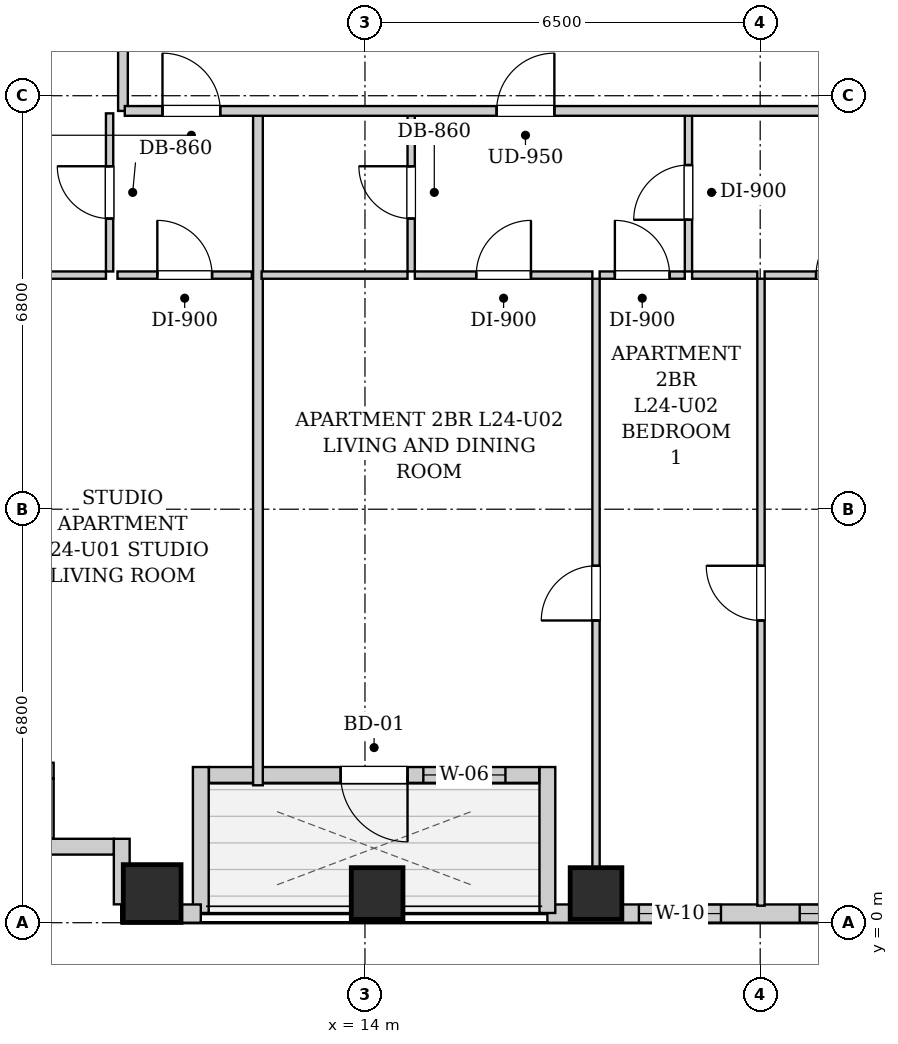
"""IFC4 building model, lengths in metres.
Left out: names, types, materials, properties, quantities, classifications, styles, units other than length and angle.
Written with IfcOpenShell. Run it as: python <this file> out.ifc"""

import sys

from ifc_helpers import new_model, si_unit, direction, frame, frame_2d, origin, origin_2d, place, context, subcontext, project, spatial, rectangle, extrude, element, fill, save


model = new_model("IFC4")
c1 = context("Model", 3, precision=1e-05, world=origin(), true_north=direction((0.0, 1.0)))
c2 = subcontext(c1, "Body", "Model", "MODEL_VIEW")
j1 = project(units=[si_unit("LENGTHUNIT", "METRE"), si_unit("PLANEANGLEUNIT", "RADIAN")], contexts=[c1])
p1 = place(None, origin())
s1 = spatial("IfcSite", under=j1, at=p1, CompositionType="ELEMENT")
p2 = place(p1, origin())
s2 = spatial("IfcBuilding", under=s1, at=p2, CompositionType="ELEMENT")
p3 = place(p2, frame((0.0, 0.0, 87.9)))
s3 = spatial("IfcBuildingStorey", under=s2, at=p3, CompositionType="ELEMENT", Elevation=87.9)
p4 = place(p3, frame((10.5, 0.48, 0.0), z_axis=(0.0, 0.0, 1.0), x_axis=(1.0, 0.0, 0.0)))
e1 = element("IfcColumn", 1, at=p4, inside=s3, PredefinedType="COLUMN", context=c2, shape_type="SweptSolid", body=[
    extrude(rectangle(XDim=0.95, YDim=0.95, at=origin_2d()), origin(), (0.0, 0.0, 1.0), 3.2),
])
for number, where, z_axis, x_axis in (
    (2, (14.2, 0.48, 0.0), (0.0, 0.0, 1.0), (1.0, 0.0, 0.0)),
    (3, (17.8, 0.48, 0.0), (0.0, 0.0, 1.0), (1.0, 0.0, 0.0)),
):
    element("IfcColumn", number, at=place(p3, frame(where, z_axis=z_axis, x_axis=x_axis)), inside=s3, PredefinedType="COLUMN", context=c2, shape_type="SweptSolid", body=[
        extrude(rectangle(XDim=0.85, YDim=0.85, at=origin_2d()), origin(), (0.0, 0.0, 1.0), 3.2),
    ])
p5 = place(p3, frame((40.9, 0.15, 0.0), z_axis=(0.0, 0.0, 1.0), x_axis=(-1.0, 0.0, 0.0)))
e4 = element("IfcWall", 4, at=p5, inside=s3, PredefinedType="SOLIDWALL", context=c2, shape_type="SweptSolid", body=[
    extrude(rectangle(XDim=23.9, YDim=0.3, at=frame_2d((11.95, 0.0))), origin(), (0.0, 0.0, 1.0), 2.94),
])
p6 = place(p5, frame((21.045, 0.0, 0.55)))
e5 = element("IfcOpeningElement", 5, at=p6, cuts=e4, PredefinedType="OPENING", context=c2, shape_type="SweptSolid", body=[
    extrude(rectangle(XDim=1.35, YDim=1.2, at=frame_2d((0.675, 0.6))), frame((0.0, 0.16, 0.0), z_axis=(0.0, -1.0, 0.0), x_axis=(1.0, 0.0, 0.0)), (0.0, 0.0, 1.0), 0.32),
])
p7 = place(p5, frame((18.4, 0.0, 0.55)))
e6 = element("IfcOpeningElement", 6, at=p7, cuts=e4, PredefinedType="OPENING", context=c2, shape_type="SweptSolid", body=[
    extrude(rectangle(XDim=1.35, YDim=1.2, at=frame_2d((0.675, 0.6))), frame((0.0, 0.16, 0.0), z_axis=(0.0, -1.0, 0.0), x_axis=(1.0, 0.0, 0.0)), (0.0, 0.0, 1.0), 0.32),
])
p8 = place(p5, frame((12.05, 0.0, 0.55)))
e7 = element("IfcOpeningElement", 7, at=p8, cuts=e4, PredefinedType="OPENING", context=c2, shape_type="SweptSolid", body=[
    extrude(rectangle(XDim=1.35, YDim=1.2, at=frame_2d((0.675, 0.6))), frame((0.0, 0.16, 0.0), z_axis=(0.0, -1.0, 0.0), x_axis=(1.0, 0.0, 0.0)), (0.0, 0.0, 1.0), 0.32),
])
p9 = place(p5, frame((8.72, 0.0, 0.55)))
e8 = element("IfcOpeningElement", 8, at=p9, cuts=e4, PredefinedType="OPENING", context=c2, shape_type="SweptSolid", body=[
    extrude(rectangle(XDim=1.35, YDim=1.2, at=frame_2d((0.675, 0.6))), frame((0.0, 0.16, 0.0), z_axis=(0.0, -1.0, 0.0), x_axis=(1.0, 0.0, 0.0)), (0.0, 0.0, 1.0), 0.32),
])
p10 = place(p5, frame((5.563, 0.0, 0.55)))
e9 = element("IfcOpeningElement", 9, at=p10, cuts=e4, PredefinedType="OPENING", context=c2, shape_type="SweptSolid", body=[
    extrude(rectangle(XDim=1.35, YDim=1.2, at=frame_2d((0.675, 0.6))), frame((0.0, 0.16, 0.0), z_axis=(0.0, -1.0, 0.0), x_axis=(1.0, 0.0, 0.0)), (0.0, 0.0, 1.0), 0.32),
])
p11 = place(p3, frame((17.0, 0.16, 0.0), z_axis=(0.0, 0.0, 1.0), x_axis=(0.0, 1.0, 0.0)))
e10 = element("IfcWall", 10, at=p11, inside=s3, PredefinedType="SOLIDWALL", context=c2, shape_type="SweptSolid", body=[
    extrude(rectangle(XDim=2.4, YDim=0.26, at=frame_2d((1.2, 0.0))), origin(), (0.0, 0.0, 1.0), 2.94),
])
p12 = place(p3, frame((16.866, 2.43, 0.0), z_axis=(0.0, 0.0, 1.0), x_axis=(-1.0, 0.0, 0.0)))
e11 = element("IfcWall", 11, at=p12, inside=s3, PredefinedType="SOLIDWALL", context=c2, shape_type="SweptSolid", body=[
    extrude(rectangle(XDim=5.432, YDim=0.26, at=frame_2d((2.716, 0.0))), origin(), (0.0, 0.0, 1.0), 2.94),
])
p13 = place(p12, frame((2.166, 0.0, 0.0)))
e12 = element("IfcOpeningElement", 12, at=p13, cuts=e11, PredefinedType="OPENING", context=c2, shape_type="SweptSolid", body=[
    extrude(rectangle(XDim=1.1, YDim=2.0, at=frame_2d((0.55, 1.0))), frame((0.0, 0.14, 0.0), z_axis=(0.0, -1.0, 0.0), x_axis=(1.0, 0.0, 0.0)), (0.0, 0.0, 1.0), 0.28),
])
p14 = place(p12, frame((0.556, 0.0, 0.85)))
e13 = element("IfcOpeningElement", 13, at=p14, cuts=e11, PredefinedType="OPENING", context=c2, shape_type="SweptSolid", body=[
    extrude(rectangle(XDim=1.35, YDim=1.65, at=frame_2d((0.675, 0.825))), frame((0.0, 0.14, 0.0), z_axis=(0.0, -1.0, 0.0), x_axis=(1.0, 0.0, 0.0)), (0.0, 0.0, 1.0), 0.28),
])
p15 = place(p3, frame((11.3, 2.56, 0.0), z_axis=(0.0, 0.0, 1.0), x_axis=(0.0, -1.0, 0.0)))
e14 = element("IfcWall", 14, at=p15, inside=s3, PredefinedType="SOLIDWALL", context=c2, shape_type="SweptSolid", body=[
    extrude(rectangle(XDim=2.4, YDim=0.26, at=frame_2d((1.2, 0.0))), origin(), (0.0, 0.0, 1.0), 2.94),
])
p16 = place(p3, frame((11.3, 0.15, 0.0), z_axis=(0.0, 0.0, 1.0), x_axis=(-1.0, 0.0, 0.0)))
e15 = element("IfcWall", 15, at=p16, inside=s3, PredefinedType="SOLIDWALL", context=c2, shape_type="SweptSolid", body=[
    extrude(rectangle(XDim=1.3, YDim=0.3, at=frame_2d((0.65, 0.0))), origin(), (0.0, 0.0, 1.0), 2.94),
])
p17 = place(p3, frame((10.0, 0.302, 0.0), z_axis=(0.0, 0.0, 1.0), x_axis=(0.0, 1.0, 0.0)))
e16 = element("IfcWall", 16, at=p17, inside=s3, PredefinedType="SOLIDWALL", context=c2, shape_type="SweptSolid", body=[
    extrude(rectangle(XDim=1.078, YDim=0.26, at=frame_2d((0.539, 0.0))), origin(), (0.0, 0.0, 1.0), 2.94),
])
p18 = place(p3, frame((9.868, 1.25, 0.0), z_axis=(0.0, 0.0, 1.0), x_axis=(-1.0, 0.0, 0.0)))
e17 = element("IfcWall", 17, at=p18, inside=s3, PredefinedType="SOLIDWALL", context=c2, shape_type="SweptSolid", body=[
    extrude(rectangle(XDim=1.248, YDim=0.26, at=frame_2d((0.624, 0.0))), origin(), (0.0, 0.0, 1.0), 2.94),
])
p19 = place(p3, frame((8.75, 1.382, 0.0), z_axis=(0.0, 0.0, 1.0), x_axis=(0.0, 1.0, 0.0)))
e18 = element("IfcWall", 18, at=p19, inside=s3, PredefinedType="SOLIDWALL", context=c2, shape_type="SweptSolid", body=[
    extrude(rectangle(XDim=0.986, YDim=0.26, at=frame_2d((0.493, 0.0))), origin(), (0.0, 0.0, 1.0), 2.94),
])
p20 = place(p3, frame((8.88, 2.5, 0.0), z_axis=(0.0, 0.0, 1.0), x_axis=(-1.0, 0.0, 0.0)))
e19 = element("IfcWall", 19, at=p20, inside=s3, PredefinedType="SOLIDWALL", context=c2, shape_type="SweptSolid", body=[
    extrude(rectangle(XDim=1.078, YDim=0.26, at=frame_2d((0.539, 0.0))), origin(), (0.0, 0.0, 1.0), 2.94),
])
p21 = place(p3, frame((10.02, 13.35, 0.0), z_axis=(0.0, 0.0, 1.0), x_axis=(0.0, 1.0, 0.0)))
e20 = element("IfcWall", 20, at=p21, inside=s3, PredefinedType="PARTITIONING", context=c2, shape_type="SweptSolid", body=[
    extrude(rectangle(XDim=1.74, YDim=0.16, at=frame_2d((0.87, 0.0))), origin(), (0.0, 0.0, 1.0), 2.94),
])
p22 = place(p3, frame((9.8, 10.71, 0.0), z_axis=(0.0, 0.0, 1.0), x_axis=(0.0, 1.0, 0.0)))
e21 = element("IfcWall", 21, at=p22, inside=s3, PredefinedType="PARTITIONING", context=c2, shape_type="SweptSolid", body=[
    extrude(rectangle(XDim=2.6, YDim=0.12, at=frame_2d((1.3, 0.0))), origin(), (0.0, 0.0, 1.0), 2.94),
])
p23 = place(p22, frame((0.87, 0.0, 0.0)))
e22 = element("IfcOpeningElement", 22, at=p23, cuts=e21, PredefinedType="OPENING", context=c2, shape_type="SweptSolid", body=[
    extrude(rectangle(XDim=0.86, YDim=2.05, at=frame_2d((0.43, 1.025))), frame((0.0, 0.07, 0.0), z_axis=(0.0, -1.0, 0.0), x_axis=(1.0, 0.0, 0.0)), (0.0, 0.0, 1.0), 0.14),
])
p24 = place(p3, frame((7.89, 10.65, 0.0), z_axis=(0.0, 0.0, 1.0), x_axis=(1.0, 0.0, 0.0)))
e23 = element("IfcWall", 23, at=p24, inside=s3, PredefinedType="PARTITIONING", context=c2, shape_type="SweptSolid", body=[
    extrude(rectangle(XDim=1.85, YDim=0.12, at=frame_2d((0.925, 0.0))), origin(), (0.0, 0.0, 1.0), 2.94),
])
p25 = place(p3, frame((9.93, 10.65, 0.0), z_axis=(0.0, 0.0, 1.0), x_axis=(1.0, 0.0, 0.0)))
e24 = element("IfcWall", 24, at=p25, inside=s3, PredefinedType="PARTITIONING", context=c2, shape_type="SweptSolid", body=[
    extrude(rectangle(XDim=2.21, YDim=0.12, at=frame_2d((1.105, 0.0))), origin(), (0.0, 0.0, 1.0), 2.94),
])
p26 = place(p25, frame((0.655, 0.0, 0.0)))
e25 = element("IfcOpeningElement", 25, at=p26, cuts=e24, PredefinedType="OPENING", context=c2, shape_type="SweptSolid", body=[
    extrude(rectangle(XDim=0.9, YDim=2.05, at=frame_2d((0.45, 1.025))), frame((0.0, 0.07, 0.0), z_axis=(0.0, -1.0, 0.0), x_axis=(1.0, 0.0, 0.0)), (0.0, 0.0, 1.0), 0.14),
])
p27 = place(p3, frame((12.24, 2.26, 0.0), z_axis=(0.0, 0.0, 1.0), x_axis=(0.0, 1.0, 0.0)))
e26 = element("IfcWall", 26, at=p27, inside=s3, PredefinedType="PARTITIONING", context=c2, shape_type="SweptSolid", body=[
    extrude(rectangle(XDim=11.05, YDim=0.16, at=frame_2d((5.525, 0.0))), origin(), (0.0, 0.0, 1.0), 2.94),
])
p28 = place(p3, frame((14.76, 10.71, 0.0), z_axis=(0.0, 0.0, 1.0), x_axis=(0.0, 1.0, 0.0)))
e27 = element("IfcWall", 27, at=p28, inside=s3, PredefinedType="PARTITIONING", context=c2, shape_type="SweptSolid", body=[
    extrude(rectangle(XDim=2.6, YDim=0.12, at=frame_2d((1.3, 0.0))), origin(), (0.0, 0.0, 1.0), 2.94),
])
p29 = place(p28, frame((0.87, 0.0, 0.0)))
e28 = element("IfcOpeningElement", 28, at=p29, cuts=e27, PredefinedType="OPENING", context=c2, shape_type="SweptSolid", body=[
    extrude(rectangle(XDim=0.86, YDim=2.05, at=frame_2d((0.43, 1.025))), frame((0.0, 0.07, 0.0), z_axis=(0.0, -1.0, 0.0), x_axis=(1.0, 0.0, 0.0)), (0.0, 0.0, 1.0), 0.14),
])
p30 = place(p3, frame((12.3, 10.65, 0.0), z_axis=(0.0, 0.0, 1.0), x_axis=(1.0, 0.0, 0.0)))
e29 = element("IfcWall", 29, at=p30, inside=s3, PredefinedType="PARTITIONING", context=c2, shape_type="SweptSolid", body=[
    extrude(rectangle(XDim=2.4, YDim=0.12, at=frame_2d((1.2, 0.0))), origin(), (0.0, 0.0, 1.0), 2.94),
])
p31 = place(p3, frame((19.32, 10.71, 0.0), z_axis=(0.0, 0.0, 1.0), x_axis=(0.0, 1.0, 0.0)))
e30 = element("IfcWall", 30, at=p31, inside=s3, PredefinedType="PARTITIONING", context=c2, shape_type="SweptSolid", body=[
    extrude(rectangle(XDim=2.6, YDim=0.12, at=frame_2d((1.3, 0.0))), origin(), (0.0, 0.0, 1.0), 2.94),
])
p32 = place(p31, frame((0.85, 0.0, 0.0)))
e31 = element("IfcOpeningElement", 31, at=p32, cuts=e30, PredefinedType="OPENING", context=c2, shape_type="SweptSolid", body=[
    extrude(rectangle(XDim=0.9, YDim=2.05, at=frame_2d((0.45, 1.025))), frame((0.0, 0.07, 0.0), z_axis=(0.0, -1.0, 0.0), x_axis=(1.0, 0.0, 0.0)), (0.0, 0.0, 1.0), 0.14),
])
p33 = place(p3, frame((14.82, 10.65, 0.0), z_axis=(0.0, 0.0, 1.0), x_axis=(1.0, 0.0, 0.0)))
e32 = element("IfcWall", 32, at=p33, inside=s3, PredefinedType="PARTITIONING", context=c2, shape_type="SweptSolid", body=[
    extrude(rectangle(XDim=2.92, YDim=0.12, at=frame_2d((1.46, 0.0))), origin(), (0.0, 0.0, 1.0), 2.94),
])
p34 = place(p33, frame((1.01, 0.0, 0.0)))
e33 = element("IfcOpeningElement", 33, at=p34, cuts=e32, PredefinedType="OPENING", context=c2, shape_type="SweptSolid", body=[
    extrude(rectangle(XDim=0.9, YDim=2.05, at=frame_2d((0.45, 1.025))), frame((0.0, 0.07, 0.0), z_axis=(0.0, -1.0, 0.0), x_axis=(1.0, 0.0, 0.0)), (0.0, 0.0, 1.0), 0.14),
])
p35 = place(p3, frame((17.86, 10.65, 0.0), z_axis=(0.0, 0.0, 1.0), x_axis=(1.0, 0.0, 0.0)))
e34 = element("IfcWall", 34, at=p35, inside=s3, PredefinedType="PARTITIONING", context=c2, shape_type="SweptSolid", body=[
    extrude(rectangle(XDim=1.4, YDim=0.12, at=frame_2d((0.7, 0.0))), origin(), (0.0, 0.0, 1.0), 2.94),
])
p36 = place(p35, frame((0.25, 0.0, 0.0)))
e35 = element("IfcOpeningElement", 35, at=p36, cuts=e34, PredefinedType="OPENING", context=c2, shape_type="SweptSolid", body=[
    extrude(rectangle(XDim=0.9, YDim=2.05, at=frame_2d((0.45, 1.025))), frame((0.0, 0.07, 0.0), z_axis=(0.0, -1.0, 0.0), x_axis=(1.0, 0.0, 0.0)), (0.0, 0.0, 1.0), 0.14),
])
p37 = place(p3, frame((19.38, 10.65, 0.0), z_axis=(0.0, 0.0, 1.0), x_axis=(1.0, 0.0, 0.0)))
e36 = element("IfcWall", 36, at=p37, inside=s3, PredefinedType="PARTITIONING", context=c2, shape_type="SweptSolid", body=[
    extrude(rectangle(XDim=1.073, YDim=0.12, at=frame_2d((0.537, 0.0))), origin(), (0.0, 0.0, 1.0), 2.94),
])
p38 = place(p3, frame((20.573, 10.65, 0.0), z_axis=(0.0, 0.0, 1.0), x_axis=(1.0, 0.0, 0.0)))
e37 = element("IfcWall", 37, at=p38, inside=s3, PredefinedType="PARTITIONING", context=c2, shape_type="SweptSolid", body=[
    extrude(rectangle(XDim=2.592, YDim=0.12, at=frame_2d((1.296, 0.0))), origin(), (0.0, 0.0, 1.0), 2.94),
])
p39 = place(p38, frame((0.846, 0.0, 0.0)))
e38 = element("IfcOpeningElement", 38, at=p39, cuts=e37, PredefinedType="OPENING", context=c2, shape_type="SweptSolid", body=[
    extrude(rectangle(XDim=0.9, YDim=2.05, at=frame_2d((0.45, 1.025))), frame((0.0, 0.07, 0.0), z_axis=(0.0, -1.0, 0.0), x_axis=(1.0, 0.0, 0.0)), (0.0, 0.0, 1.0), 0.14),
])
p40 = place(p3, frame((17.8, 0.28, 0.0), z_axis=(0.0, 0.0, 1.0), x_axis=(0.0, 1.0, 0.0)))
e39 = element("IfcWall", 39, at=p40, inside=s3, PredefinedType="PARTITIONING", context=c2, shape_type="SweptSolid", body=[
    extrude(rectangle(XDim=10.31, YDim=0.12, at=frame_2d((5.155, 0.0))), origin(), (0.0, 0.0, 1.0), 2.309),
])
p41 = place(p40, frame((4.69, 0.0, 0.0)))
e40 = element("IfcOpeningElement", 40, at=p41, cuts=e39, PredefinedType="OPENING", context=c2, shape_type="SweptSolid", body=[
    extrude(rectangle(XDim=0.9, YDim=2.05, at=frame_2d((0.45, 1.025))), frame((0.0, 0.07, 0.0), z_axis=(0.0, -1.0, 0.0), x_axis=(1.0, 0.0, 0.0)), (0.0, 0.0, 1.0), 0.14),
])
p42 = place(p3, frame((20.513, 0.28, 0.0), z_axis=(0.0, 0.0, 1.0), x_axis=(0.0, 1.0, 0.0)))
e41 = element("IfcWall", 41, at=p42, inside=s3, PredefinedType="PARTITIONING", context=c2, shape_type="SweptSolid", body=[
    extrude(rectangle(XDim=10.31, YDim=0.12, at=frame_2d((5.155, 0.0))), origin(), (0.0, 0.0, 1.0), 2.94),
])
p43 = place(p42, frame((4.69, 0.0, 0.0)))
e42 = element("IfcOpeningElement", 42, at=p43, cuts=e41, PredefinedType="OPENING", context=c2, shape_type="SweptSolid", body=[
    extrude(rectangle(XDim=0.9, YDim=2.05, at=frame_2d((0.45, 1.025))), frame((0.0, 0.07, 0.0), z_axis=(0.0, -1.0, 0.0), x_axis=(1.0, 0.0, 0.0)), (0.0, 0.0, 1.0), 0.14),
])
p44 = place(p3, frame((10.05, 13.35, 0.0), z_axis=(0.0, 0.0, 1.0), x_axis=(1.0, 0.0, 0.0)))
e43 = element("IfcWall", 43, at=p44, inside=s3, PredefinedType="PARTITIONING", context=c2, shape_type="SweptSolid", body=[
    extrude(rectangle(XDim=30.8, YDim=0.16, at=frame_2d((15.4, 0.0))), origin(), (0.0, 0.0, 1.0), 2.94),
])
p45 = place(p44, frame((0.62, 0.0, 0.0)))
e44 = element("IfcOpeningElement", 44, at=p45, cuts=e43, PredefinedType="OPENING", context=c2, shape_type="SweptSolid", body=[
    extrude(rectangle(XDim=0.95, YDim=2.1, at=frame_2d((0.475, 1.05))), frame((0.0, 0.09, 0.0), z_axis=(0.0, -1.0, 0.0), x_axis=(1.0, 0.0, 0.0)), (0.0, 0.0, 1.0), 0.18),
])
p46 = place(p44, frame((6.115, 0.0, 0.0)))
e45 = element("IfcOpeningElement", 45, at=p46, cuts=e43, PredefinedType="OPENING", context=c2, shape_type="SweptSolid", body=[
    extrude(rectangle(XDim=0.95, YDim=2.1, at=frame_2d((0.475, 1.05))), frame((0.0, 0.09, 0.0), z_axis=(0.0, -1.0, 0.0), x_axis=(1.0, 0.0, 0.0)), (0.0, 0.0, 1.0), 0.18),
])
p47 = place(p44, frame((17.056, 0.0, 0.0)))
e46 = element("IfcOpeningElement", 46, at=p47, cuts=e43, PredefinedType="OPENING", context=c2, shape_type="SweptSolid", body=[
    extrude(rectangle(XDim=0.95, YDim=2.1, at=frame_2d((0.475, 1.05))), frame((0.0, 0.09, 0.0), z_axis=(0.0, -1.0, 0.0), x_axis=(1.0, 0.0, 0.0)), (0.0, 0.0, 1.0), 0.18),
])
p48 = place(p44, frame((24.025, 0.0, 0.0)))
e47 = element("IfcOpeningElement", 47, at=p48, cuts=e43, PredefinedType="OPENING", context=c2, shape_type="SweptSolid", body=[
    extrude(rectangle(XDim=0.95, YDim=2.1, at=frame_2d((0.475, 1.05))), frame((0.0, 0.09, 0.0), z_axis=(0.0, -1.0, 0.0), x_axis=(1.0, 0.0, 0.0)), (0.0, 0.0, 1.0), 0.18),
])
p49 = place(p23, origin())
e48 = element("IfcDoor", 48, at=p49, inside=s3, OperationType="SINGLE_SWING_RIGHT", PredefinedType="DOOR", context=c2, shape_type="SweptSolid", body=[
    extrude(rectangle(XDim=0.86, YDim=2.05, at=frame_2d((0.43, 1.025))), frame((0.0, 0.025, 0.0), z_axis=(0.0, -1.0, 0.0), x_axis=(1.0, 0.0, 0.0)), (0.0, 0.0, 1.0), 0.05),
])
fill(e22, e48)
p50 = place(p26, origin())
e49 = element("IfcDoor", 49, at=p50, inside=s3, OperationType="SINGLE_SWING_LEFT", PredefinedType="DOOR", context=c2, shape_type="SweptSolid", body=[
    extrude(rectangle(XDim=0.9, YDim=2.05, at=frame_2d((0.45, 1.025))), frame((0.0, 0.025, 0.0), z_axis=(0.0, -1.0, 0.0), x_axis=(1.0, 0.0, 0.0)), (0.0, 0.0, 1.0), 0.05),
])
fill(e25, e49)
p51 = place(p29, origin())
e50 = element("IfcDoor", 50, at=p51, inside=s3, OperationType="SINGLE_SWING_RIGHT", PredefinedType="DOOR", context=c2, shape_type="SweptSolid", body=[
    extrude(rectangle(XDim=0.86, YDim=2.05, at=frame_2d((0.43, 1.025))), frame((0.0, 0.025, 0.0), z_axis=(0.0, -1.0, 0.0), x_axis=(1.0, 0.0, 0.0)), (0.0, 0.0, 1.0), 0.05),
])
fill(e28, e50)
p52 = place(p32, origin())
e51 = element("IfcDoor", 51, at=p52, inside=s3, OperationType="SINGLE_SWING_LEFT", PredefinedType="DOOR", context=c2, shape_type="SweptSolid", body=[
    extrude(rectangle(XDim=0.9, YDim=2.05, at=frame_2d((0.45, 1.025))), frame((0.0, 0.025, 0.0), z_axis=(0.0, -1.0, 0.0), x_axis=(1.0, 0.0, 0.0)), (0.0, 0.0, 1.0), 0.05),
])
fill(e31, e51)
p53 = place(p34, origin())
e52 = element("IfcDoor", 52, at=p53, inside=s3, OperationType="SINGLE_SWING_RIGHT", PredefinedType="DOOR", context=c2, shape_type="SweptSolid", body=[
    extrude(rectangle(XDim=0.9, YDim=2.05, at=frame_2d((0.45, 1.025))), frame((0.0, 0.025, 0.0), z_axis=(0.0, -1.0, 0.0), x_axis=(1.0, 0.0, 0.0)), (0.0, 0.0, 1.0), 0.05),
])
fill(e33, e52)
p54 = place(p36, origin())
e53 = element("IfcDoor", 53, at=p54, inside=s3, OperationType="SINGLE_SWING_LEFT", PredefinedType="DOOR", context=c2, shape_type="SweptSolid", body=[
    extrude(rectangle(XDim=0.9, YDim=2.05, at=frame_2d((0.45, 1.025))), frame((0.0, 0.025, 0.0), z_axis=(0.0, -1.0, 0.0), x_axis=(1.0, 0.0, 0.0)), (0.0, 0.0, 1.0), 0.05),
])
fill(e35, e53)
p55 = place(p39, origin())
e54 = element("IfcDoor", 54, at=p55, inside=s3, OperationType="SINGLE_SWING_RIGHT", PredefinedType="DOOR", context=c2, shape_type="SweptSolid", body=[
    extrude(rectangle(XDim=0.9, YDim=2.05, at=frame_2d((0.45, 1.025))), frame((0.0, 0.025, 0.0), z_axis=(0.0, -1.0, 0.0), x_axis=(1.0, 0.0, 0.0)), (0.0, 0.0, 1.0), 0.05),
])
fill(e38, e54)
p56 = place(p41, origin())
e55 = element("IfcDoor", 55, at=p56, inside=s3, OperationType="SINGLE_SWING_LEFT", PredefinedType="DOOR", context=c2, shape_type="SweptSolid", body=[
    extrude(rectangle(XDim=0.9, YDim=2.05, at=frame_2d((0.45, 1.025))), frame((0.0, 0.025, 0.0), z_axis=(0.0, -1.0, 0.0), x_axis=(1.0, 0.0, 0.0)), (0.0, 0.0, 1.0), 0.05),
])
fill(e40, e55)
p57 = place(p43, origin())
e56 = element("IfcDoor", 56, at=p57, inside=s3, OperationType="SINGLE_SWING_RIGHT", PredefinedType="DOOR", context=c2, shape_type="SweptSolid", body=[
    extrude(rectangle(XDim=0.9, YDim=2.05, at=frame_2d((0.45, 1.025))), frame((0.0, 0.025, 0.0), z_axis=(0.0, -1.0, 0.0), x_axis=(1.0, 0.0, 0.0)), (0.0, 0.0, 1.0), 0.05),
])
fill(e42, e56)
p58 = place(p45, origin())
e57 = element("IfcDoor", 57, at=p58, inside=s3, OperationType="SINGLE_SWING_LEFT", PredefinedType="DOOR", context=c2, shape_type="SweptSolid", body=[
    extrude(rectangle(XDim=0.95, YDim=2.1, at=frame_2d((0.475, 1.05))), frame((0.0, 0.025, 0.0), z_axis=(0.0, -1.0, 0.0), x_axis=(1.0, 0.0, 0.0)), (0.0, 0.0, 1.0), 0.05),
])
fill(e44, e57)
p59 = place(p46, origin())
e58 = element("IfcDoor", 58, at=p59, inside=s3, OperationType="SINGLE_SWING_RIGHT", PredefinedType="DOOR", context=c2, shape_type="SweptSolid", body=[
    extrude(rectangle(XDim=0.95, YDim=2.1, at=frame_2d((0.475, 1.05))), frame((0.0, 0.025, 0.0), z_axis=(0.0, -1.0, 0.0), x_axis=(1.0, 0.0, 0.0)), (0.0, 0.0, 1.0), 0.05),
])
fill(e45, e58)
p60 = place(p13, origin())
e59 = element("IfcDoor", 59, at=p60, inside=s3, OperationType="SINGLE_SWING_LEFT", PredefinedType="DOOR", context=c2, shape_type="SweptSolid", body=[
    extrude(rectangle(XDim=1.1, YDim=2.0, at=frame_2d((0.55, 1.0))), frame((0.0, 0.025, 0.0), z_axis=(0.0, -1.0, 0.0), x_axis=(1.0, 0.0, 0.0)), (0.0, 0.0, 1.0), 0.05),
])
fill(e12, e59)
p61 = place(p14, origin())
e60 = element("IfcWindow", 60, at=p61, inside=s3, PartitioningType="SINGLE_PANEL", PredefinedType="WINDOW", context=c2, shape_type="SweptSolid", body=[
    extrude(rectangle(XDim=1.35, YDim=1.65, at=frame_2d((0.675, 0.825))), frame((0.0, 0.03, 0.0), z_axis=(0.0, -1.0, 0.0), x_axis=(1.0, 0.0, 0.0)), (0.0, 0.0, 1.0), 0.06),
])
fill(e13, e60)
p62 = place(p6, origin())
e61 = element("IfcWindow", 61, at=p62, inside=s3, PartitioningType="SINGLE_PANEL", PredefinedType="WINDOW", context=c2, shape_type="SweptSolid", body=[
    extrude(rectangle(XDim=1.35, YDim=1.2, at=frame_2d((0.675, 0.6))), frame((0.0, 0.03, 0.0), z_axis=(0.0, -1.0, 0.0), x_axis=(1.0, 0.0, 0.0)), (0.0, 0.0, 1.0), 0.06),
])
fill(e5, e61)
p63 = place(p7, origin())
e62 = element("IfcWindow", 62, at=p63, inside=s3, PartitioningType="SINGLE_PANEL", PredefinedType="WINDOW", context=c2, shape_type="SweptSolid", body=[
    extrude(rectangle(XDim=1.35, YDim=1.2, at=frame_2d((0.675, 0.6))), frame((0.0, 0.03, 0.0), z_axis=(0.0, -1.0, 0.0), x_axis=(1.0, 0.0, 0.0)), (0.0, 0.0, 1.0), 0.06),
])
fill(e6, e62)
save(model, sys.argv[1])
